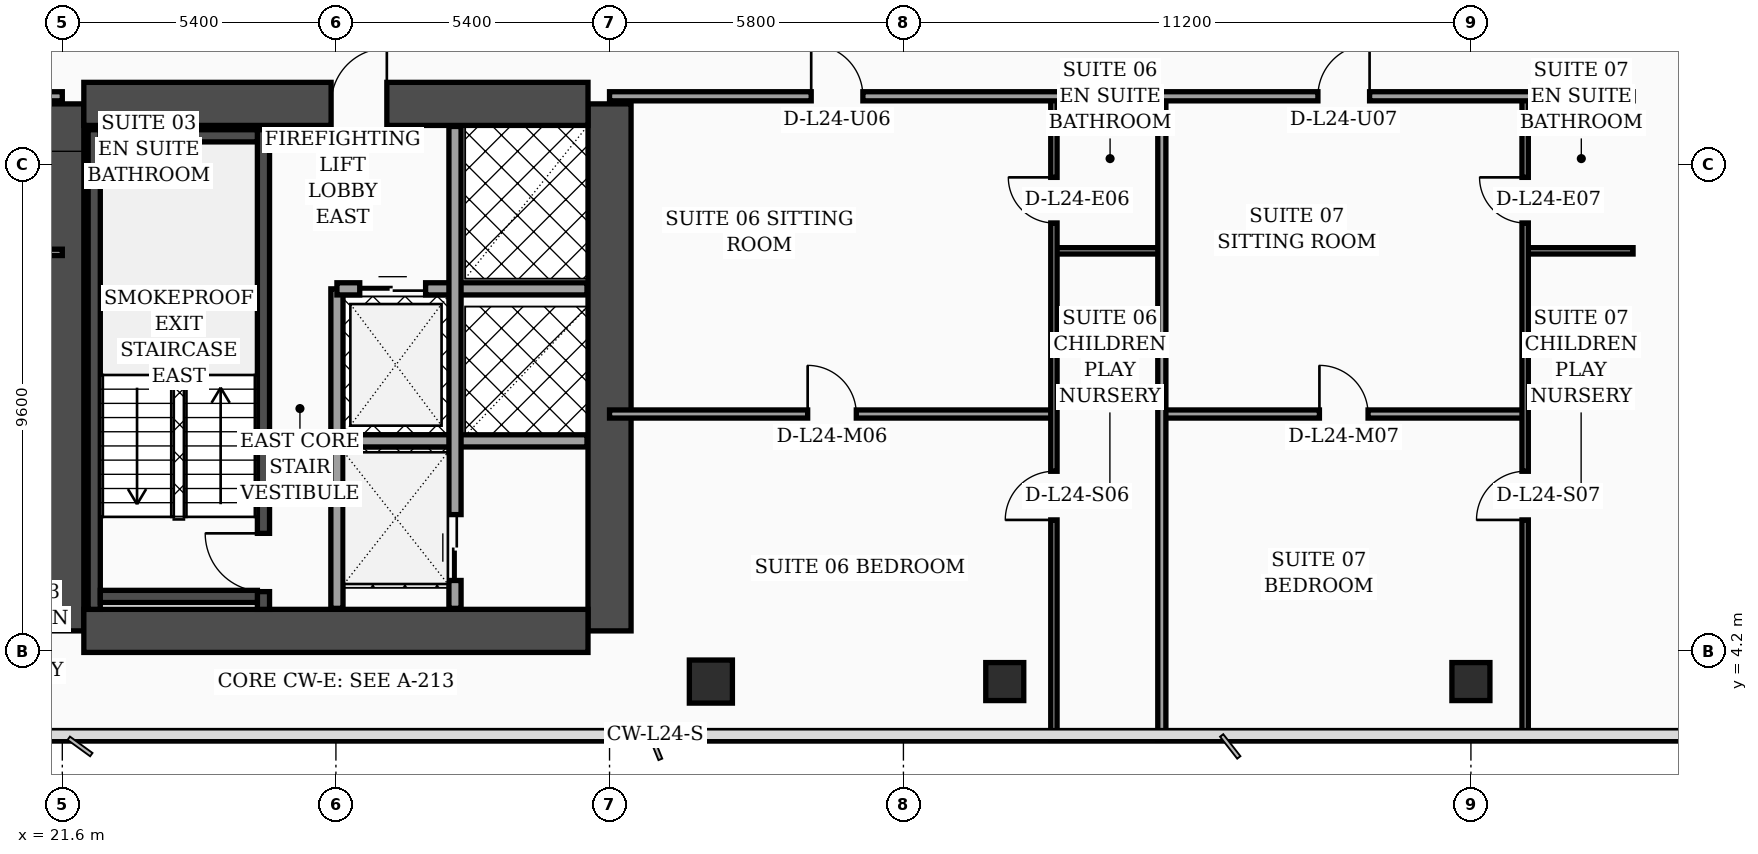
"""IFC4 building model, lengths in metres.
Left out: names, types, materials, properties, quantities, classifications, styles, units other than length and angle.
Written with IfcOpenShell. Run it as: python <this file> out.ifc"""

import sys

from ifc_helpers import new_model, si_unit, direction, frame, frame_2d, origin, origin_2d, place, context, subcontext, project, spatial, rectangle, hollow_rectangle, extrude, element, fill, save


model = new_model("IFC4")
c1 = context("Model", 3, precision=1e-05, world=origin(), true_north=direction((0.0, 1.0)))
c2 = subcontext(c1, "Body", "Model", "MODEL_VIEW")
j1 = project(units=[si_unit("LENGTHUNIT", "METRE"), si_unit("PLANEANGLEUNIT", "RADIAN")], contexts=[c1])
p1 = place(None, origin())
s1 = spatial("IfcSite", under=j1, at=p1, CompositionType="ELEMENT")
p2 = place(p1, origin())
s2 = spatial("IfcBuilding", under=s1, at=p2, CompositionType="ELEMENT")
p3 = place(p2, frame((0.0, 0.0, 101.2)))
s3 = spatial("IfcBuildingStorey", under=s2, at=p3, CompositionType="ELEMENT", Elevation=101.2)
for number, where, z_axis, x_axis in (
    (1, (21.6, 4.6, 0.0), (0.0, 0.0, 1.0), (0.0, 1.0, 0.0)),
    (2, (32.4, 4.6, 0.0), (0.0, 0.0, 1.0), (0.0, 1.0, 0.0)),
):
    element("IfcWall", number, at=place(p3, frame(where, z_axis=z_axis, x_axis=x_axis)), inside=s3, PredefinedType="SHEAR", context=c2, shape_type="SweptSolid", body=[
        extrude(rectangle(XDim=10.4, YDim=0.85, at=frame_2d((5.2, 0.0))), origin(), (0.0, 0.0, 1.0), 3.56),
    ])
p4 = place(p3, frame((22.025, 15.0, 0.0), z_axis=(0.0, 0.0, 1.0), x_axis=(1.0, 0.0, 0.0)))
e3 = element("IfcWall", 3, at=p4, inside=s3, PredefinedType="SHEAR", context=c2, shape_type="SweptSolid", body=[
    extrude(rectangle(XDim=9.95, YDim=0.85, at=frame_2d((4.975, 0.0))), origin(), (0.0, 0.0, 1.0), 3.56),
])
p5 = place(p4, frame((4.88, 0.0, 0.0)))
e4 = element("IfcOpeningElement", 4, at=p5, cuts=e3, PredefinedType="OPENING", context=c2, shape_type="SweptSolid", body=[
    extrude(rectangle(XDim=1.1, YDim=2.2, at=frame_2d((0.55, 1.1))), frame((0.0, 0.435, 0.0), z_axis=(0.0, -1.0, 0.0), x_axis=(1.0, 0.0, 0.0)), (0.0, 0.0, 1.0), 0.87),
])
p6 = place(p3, frame((22.025, 4.6, 0.0), z_axis=(0.0, 0.0, 1.0), x_axis=(1.0, 0.0, 0.0)))
e5 = element("IfcWall", 5, at=p6, inside=s3, PredefinedType="SHEAR", context=c2, shape_type="SweptSolid", body=[
    extrude(rectangle(XDim=9.95, YDim=0.85, at=frame_2d((4.975, 0.0))), origin(), (0.0, 0.0, 1.0), 3.56),
])
p7 = place(p3, frame((22.23, 5.025, 0.0), z_axis=(0.0, 0.0, 1.0), x_axis=(0.0, 1.0, 0.0)))
e6 = element("IfcWall", 6, at=p7, inside=s3, PredefinedType="SOLIDWALL", context=c2, shape_type="SweptSolid", body=[
    extrude(rectangle(XDim=9.465, YDim=0.24, at=frame_2d((4.732, 0.0))), origin(), (0.0, 0.0, 1.0), 3.56),
])
p8 = place(p3, frame((25.57, 5.025, 0.0), z_axis=(0.0, 0.0, 1.0), x_axis=(0.0, 1.0, 0.0)))
e7 = element("IfcWall", 7, at=p8, inside=s3, PredefinedType="SOLIDWALL", context=c2, shape_type="SweptSolid", body=[
    extrude(rectangle(XDim=9.465, YDim=0.24, at=frame_2d((4.732, 0.0))), origin(), (0.0, 0.0, 1.0), 3.56),
])
p9 = place(p8, frame((0.35, 0.0, 0.0)))
e8 = element("IfcOpeningElement", 8, at=p9, cuts=e7, PredefinedType="OPENING", context=c2, shape_type="SweptSolid", body=[
    extrude(rectangle(XDim=1.15, YDim=2.2, at=frame_2d((0.575, 1.1))), frame((0.0, 0.13, 0.0), z_axis=(0.0, -1.0, 0.0), x_axis=(1.0, 0.0, 0.0)), (0.0, 0.0, 1.0), 0.26),
])
for number, where, z_axis, x_axis in (
    (9, (22.35, 5.28, 0.0), (0.0, 0.0, 1.0), (1.0, 0.0, 0.0)),
    (10, (22.35, 14.37, 0.0), (0.0, 0.0, 1.0), (1.0, 0.0, 0.0)),
):
    element("IfcWall", number, at=place(p3, frame(where, z_axis=z_axis, x_axis=x_axis)), inside=s3, PredefinedType="SOLIDWALL", context=c2, shape_type="SweptSolid", body=[
        extrude(rectangle(XDim=3.1, YDim=0.24, at=frame_2d((1.55, 0.0))), origin(), (0.0, 0.0, 1.0), 3.56),
    ])
p10 = place(p3, frame((34.4, 3.6, 0.0), z_axis=(0.0, 0.0, 1.0), x_axis=(1.0, 0.0, 0.0)))
e11 = element("IfcColumn", 11, at=p10, inside=s3, PredefinedType="COLUMN", context=c2, shape_type="SweptSolid", body=[
    extrude(hollow_rectangle(XDim=0.85, YDim=0.85, WallThickness=0.036, at=origin_2d()), origin(), (0.0, 0.0, 1.0), 3.56),
])
for number, where, z_axis, x_axis in (
    (12, (40.2, 3.6, 0.0), (0.0, 0.0, 1.0), (1.0, 0.0, 0.0)),
    (13, (49.4, 3.6, 0.0), (0.0, 0.0, 1.0), (1.0, 0.0, 0.0)),
):
    element("IfcColumn", number, at=place(p3, frame(where, z_axis=z_axis, x_axis=x_axis)), inside=s3, PredefinedType="COLUMN", context=c2, shape_type="SweptSolid", body=[
        extrude(hollow_rectangle(XDim=0.75, YDim=0.75, WallThickness=0.032, at=origin_2d()), origin(), (0.0, 0.0, 1.0), 3.56),
    ])
p11 = place(p3, frame((59.23, 5.505, 0.0), z_axis=(0.0, 0.0, 1.0), x_axis=(-0.300509063924, 0.953778958931, 0.0)))
e14 = element("IfcWall", 14, at=p11, inside=s3, PredefinedType="SOLIDWALL", context=c2, shape_type="SweptSolid", body=[
    extrude(rectangle(XDim=30.814, YDim=0.32, at=frame_2d((15.407, 0.0))), origin(), (0.0, 0.0, 1.0), 3.56),
])
p12 = place(p11, frame((4.747, 0.0, 0.0)))
e15 = element("IfcOpeningElement", 15, at=p12, cuts=e14, PredefinedType="OPENING", context=c2, shape_type="SweptSolid", body=[
    extrude(rectangle(XDim=1.4, YDim=2.25, at=frame_2d((0.7, 1.125))), frame((0.0, 0.17, 0.0), z_axis=(0.0, -1.0, 0.0), x_axis=(1.0, 0.0, 0.0)), (0.0, 0.0, 1.0), 0.34),
])
p13 = place(p11, frame((1.6, 0.0, 0.75)))
e16 = element("IfcOpeningElement", 16, at=p13, cuts=e14, PredefinedType="OPENING", context=c2, shape_type="SweptSolid", body=[
    extrude(rectangle(XDim=1.5, YDim=1.6, at=frame_2d((0.75, 0.8))), frame((0.0, 0.17, 0.0), z_axis=(0.0, -1.0, 0.0), x_axis=(1.0, 0.0, 0.0)), (0.0, 0.0, 1.0), 0.34),
])
p14 = place(p11, frame((7.8, 0.0, 0.75)))
e17 = element("IfcOpeningElement", 17, at=p14, cuts=e14, PredefinedType="OPENING", context=c2, shape_type="SweptSolid", body=[
    extrude(rectangle(XDim=1.5, YDim=1.6, at=frame_2d((0.75, 0.8))), frame((0.0, 0.17, 0.0), z_axis=(0.0, -1.0, 0.0), x_axis=(1.0, 0.0, 0.0)), (0.0, 0.0, 1.0), 0.34),
])
p15 = place(p11, frame((10.9, 0.0, 0.75)))
e18 = element("IfcOpeningElement", 18, at=p15, cuts=e14, PredefinedType="OPENING", context=c2, shape_type="SweptSolid", body=[
    extrude(rectangle(XDim=1.5, YDim=1.6, at=frame_2d((0.75, 0.8))), frame((0.0, 0.17, 0.0), z_axis=(0.0, -1.0, 0.0), x_axis=(1.0, 0.0, 0.0)), (0.0, 0.0, 1.0), 0.34),
])
p16 = place(p11, frame((14.0, 0.0, 0.75)))
e19 = element("IfcOpeningElement", 19, at=p16, cuts=e14, PredefinedType="OPENING", context=c2, shape_type="SweptSolid", body=[
    extrude(rectangle(XDim=1.5, YDim=1.6, at=frame_2d((0.75, 0.8))), frame((0.0, 0.17, 0.0), z_axis=(0.0, -1.0, 0.0), x_axis=(1.0, 0.0, 0.0)), (0.0, 0.0, 1.0), 0.34),
])
p17 = place(p11, frame((17.1, 0.0, 0.75)))
e20 = element("IfcOpeningElement", 20, at=p17, cuts=e14, PredefinedType="OPENING", context=c2, shape_type="SweptSolid", body=[
    extrude(rectangle(XDim=1.5, YDim=1.6, at=frame_2d((0.75, 0.8))), frame((0.0, 0.17, 0.0), z_axis=(0.0, -1.0, 0.0), x_axis=(1.0, 0.0, 0.0)), (0.0, 0.0, 1.0), 0.34),
])
p18 = place(p11, frame((20.2, 0.0, 0.75)))
e21 = element("IfcOpeningElement", 21, at=p18, cuts=e14, PredefinedType="OPENING", context=c2, shape_type="SweptSolid", body=[
    extrude(rectangle(XDim=1.5, YDim=1.6, at=frame_2d((0.75, 0.8))), frame((0.0, 0.17, 0.0), z_axis=(0.0, -1.0, 0.0), x_axis=(1.0, 0.0, 0.0)), (0.0, 0.0, 1.0), 0.34),
])
p19 = place(p11, frame((23.3, 0.0, 0.75)))
e22 = element("IfcOpeningElement", 22, at=p19, cuts=e14, PredefinedType="OPENING", context=c2, shape_type="SweptSolid", body=[
    extrude(rectangle(XDim=1.5, YDim=1.6, at=frame_2d((0.75, 0.8))), frame((0.0, 0.17, 0.0), z_axis=(0.0, -1.0, 0.0), x_axis=(1.0, 0.0, 0.0)), (0.0, 0.0, 1.0), 0.34),
])
p20 = place(p11, frame((26.4, 0.0, 0.75)))
e23 = element("IfcOpeningElement", 23, at=p20, cuts=e14, PredefinedType="OPENING", context=c2, shape_type="SweptSolid", body=[
    extrude(rectangle(XDim=1.5, YDim=1.6, at=frame_2d((0.75, 0.8))), frame((0.0, 0.17, 0.0), z_axis=(0.0, -1.0, 0.0), x_axis=(1.0, 0.0, 0.0)), (0.0, 0.0, 1.0), 0.34),
])
p21 = place(p3, frame((27.02, 5.045, 0.0), z_axis=(0.0, 0.0, 1.0), x_axis=(0.0, 1.0, 0.0)))
e24 = element("IfcWall", 24, at=p21, inside=s3, PredefinedType="SOLIDWALL", context=c2, shape_type="SweptSolid", body=[
    extrude(rectangle(XDim=6.305, YDim=0.24, at=frame_2d((3.153, 0.0))), origin(), (0.0, 0.0, 1.0), 3.56),
])
p22 = place(p3, frame((27.02, 11.35, 0.0), z_axis=(0.0, 0.0, 1.0), x_axis=(1.0, 0.0, 0.0)))
e25 = element("IfcWall", 25, at=p22, inside=s3, PredefinedType="SOLIDWALL", context=c2, shape_type="SweptSolid", body=[
    extrude(rectangle(XDim=4.935, YDim=0.24, at=frame_2d((2.468, 0.0))), origin(), (0.0, 0.0, 1.0), 3.56),
])
p23 = place(p22, frame((0.45, 0.0, 0.0)))
e26 = element("IfcOpeningElement", 26, at=p23, cuts=e25, PredefinedType="OPENING", context=c2, shape_type="SweptSolid", body=[
    extrude(rectangle(XDim=1.3, YDim=2.35, at=frame_2d((0.65, 1.175))), frame((0.0, 0.13, 0.0), z_axis=(0.0, -1.0, 0.0), x_axis=(1.0, 0.0, 0.0)), (0.0, 0.0, 1.0), 0.26),
])
p24 = place(p3, frame((27.02, 8.35, 0.0), z_axis=(0.0, 0.0, 1.0), x_axis=(1.0, 0.0, 0.0)))
e27 = element("IfcWall", 27, at=p24, inside=s3, PredefinedType="SOLIDWALL", context=c2, shape_type="SweptSolid", body=[
    extrude(rectangle(XDim=4.935, YDim=0.24, at=frame_2d((2.468, 0.0))), origin(), (0.0, 0.0, 1.0), 3.56),
])
p25 = place(p3, frame((29.35, 5.045, 0.0), z_axis=(0.0, 0.0, 1.0), x_axis=(0.0, 1.0, 0.0)))
e28 = element("IfcWall", 28, at=p25, inside=s3, PredefinedType="SOLIDWALL", context=c2, shape_type="SweptSolid", body=[
    extrude(rectangle(XDim=9.51, YDim=0.24, at=frame_2d((4.755, 0.0))), origin(), (0.0, 0.0, 1.0), 3.56),
])
p26 = place(p25, frame((0.55, 0.0, 0.0)))
e29 = element("IfcOpeningElement", 29, at=p26, cuts=e28, PredefinedType="OPENING", context=c2, shape_type="SweptSolid", body=[
    extrude(rectangle(XDim=1.3, YDim=2.35, at=frame_2d((0.65, 1.175))), frame((0.0, 0.13, 0.0), z_axis=(0.0, -1.0, 0.0), x_axis=(1.0, 0.0, 0.0)), (0.0, 0.0, 1.0), 0.26),
])
p27 = place(p3, frame((19.6, 12.07, 0.0), z_axis=(0.0, 0.0, 1.0), x_axis=(1.0, 0.0, 0.0)))
e30 = element("IfcWall", 30, at=p27, inside=s3, PredefinedType="PARTITIONING", context=c2, shape_type="SweptSolid", body=[
    extrude(rectangle(XDim=2.0, YDim=0.125, at=frame_2d((1.0, 0.0))), origin(), (0.0, 0.0, 1.0), 3.56),
])
p28 = place(p3, frame((15.15, 15.15, 0.0), z_axis=(0.0, 0.0, 1.0), x_axis=(1.0, 0.0, 0.0)))
e31 = element("IfcWall", 31, at=p28, inside=s3, PredefinedType="PARTITIONING", context=c2, shape_type="SweptSolid", body=[
    extrude(rectangle(XDim=6.45, YDim=0.18, at=frame_2d((3.225, 0.0))), origin(), (0.0, 0.0, 1.0), 2.49),
])
p29 = place(p28, frame((1.74, 0.0, 0.0)))
e32 = element("IfcOpeningElement", 32, at=p29, cuts=e31, PredefinedType="OPENING", context=c2, shape_type="SweptSolid", body=[
    extrude(rectangle(XDim=1.02, YDim=2.2, at=frame_2d((0.51, 1.1))), frame((0.0, 0.1, 0.0), z_axis=(0.0, -1.0, 0.0), x_axis=(1.0, 0.0, 0.0)), (0.0, 0.0, 1.0), 0.2),
])
p30 = place(p3, frame((41.17, 12.1, 0.0), z_axis=(0.0, 0.0, 1.0), x_axis=(1.0, 0.0, 0.0)))
e33 = element("IfcWall", 33, at=p30, inside=s3, PredefinedType="PARTITIONING", context=c2, shape_type="SweptSolid", body=[
    extrude(rectangle(XDim=2.13, YDim=0.125, at=frame_2d((1.065, 0.0))), origin(), (0.0, 0.0, 1.0), 3.56),
])
p31 = place(p3, frame((32.4, 8.88, 0.0), z_axis=(0.0, 0.0, 1.0), x_axis=(1.0, 0.0, 0.0)))
e34 = element("IfcWall", 34, at=p31, inside=s3, PredefinedType="PARTITIONING", context=c2, shape_type="SweptSolid", body=[
    extrude(rectangle(XDim=8.77, YDim=0.16, at=frame_2d((4.385, 0.0))), origin(), (0.0, 0.0, 1.0), 2.84),
])
p32 = place(p31, frame((3.91, 0.0, 0.0)))
e35 = element("IfcOpeningElement", 35, at=p32, cuts=e34, PredefinedType="OPENING", context=c2, shape_type="SweptSolid", body=[
    extrude(rectangle(XDim=0.96, YDim=2.2, at=frame_2d((0.48, 1.1))), frame((0.0, 0.09, 0.0), z_axis=(0.0, -1.0, 0.0), x_axis=(1.0, 0.0, 0.0)), (0.0, 0.0, 1.0), 0.18),
])
p33 = place(p3, frame((41.17, 2.44, 0.0), z_axis=(0.0, 0.0, 1.0), x_axis=(0.0, 1.0, 0.0)))
e36 = element("IfcWall", 36, at=p33, inside=s3, PredefinedType="PARTITIONING", context=c2, shape_type="SweptSolid", body=[
    extrude(rectangle(XDim=12.71, YDim=0.125, at=frame_2d((6.355, 0.0))), origin(), (0.0, 0.0, 1.0), 3.04),
])
p34 = place(p33, frame((4.35, 0.0, 0.0)))
e37 = element("IfcOpeningElement", 37, at=p34, cuts=e36, PredefinedType="OPENING", context=c2, shape_type="SweptSolid", body=[
    extrude(rectangle(XDim=0.96, YDim=2.2, at=frame_2d((0.48, 1.1))), frame((0.0, 0.073, 0.0), z_axis=(0.0, -1.0, 0.0), x_axis=(1.0, 0.0, 0.0)), (0.0, 0.0, 1.0), 0.145),
])
p35 = place(p33, frame((10.21, 0.0, 0.0)))
e38 = element("IfcOpeningElement", 38, at=p35, cuts=e36, PredefinedType="OPENING", context=c2, shape_type="SweptSolid", body=[
    extrude(rectangle(XDim=0.9, YDim=2.15, at=frame_2d((0.45, 1.075))), frame((0.0, 0.073, 0.0), z_axis=(0.0, -1.0, 0.0), x_axis=(1.0, 0.0, 0.0)), (0.0, 0.0, 1.0), 0.145),
])
p36 = place(p3, frame((50.47, 12.1, 0.0), z_axis=(0.0, 0.0, 1.0), x_axis=(1.0, 0.0, 0.0)))
e39 = element("IfcWall", 39, at=p36, inside=s3, PredefinedType="PARTITIONING", context=c2, shape_type="SweptSolid", body=[
    extrude(rectangle(XDim=2.13, YDim=0.125, at=frame_2d((1.065, 0.0))), origin(), (0.0, 0.0, 1.0), 3.56),
])
p37 = place(p3, frame((43.3, 8.88, 0.0), z_axis=(0.0, 0.0, 1.0), x_axis=(1.0, 0.0, 0.0)))
e40 = element("IfcWall", 40, at=p37, inside=s3, PredefinedType="PARTITIONING", context=c2, shape_type="SweptSolid", body=[
    extrude(rectangle(XDim=7.17, YDim=0.16, at=frame_2d((3.585, 0.0))), origin(), (0.0, 0.0, 1.0), 2.84),
])
p38 = place(p37, frame((3.11, 0.0, 0.0)))
e41 = element("IfcOpeningElement", 41, at=p38, cuts=e40, PredefinedType="OPENING", context=c2, shape_type="SweptSolid", body=[
    extrude(rectangle(XDim=0.96, YDim=2.2, at=frame_2d((0.48, 1.1))), frame((0.0, 0.09, 0.0), z_axis=(0.0, -1.0, 0.0), x_axis=(1.0, 0.0, 0.0)), (0.0, 0.0, 1.0), 0.18),
])
p39 = place(p3, frame((50.47, 2.44, 0.0), z_axis=(0.0, 0.0, 1.0), x_axis=(0.0, 1.0, 0.0)))
e42 = element("IfcWall", 42, at=p39, inside=s3, PredefinedType="PARTITIONING", context=c2, shape_type="SweptSolid", body=[
    extrude(rectangle(XDim=12.71, YDim=0.125, at=frame_2d((6.355, 0.0))), origin(), (0.0, 0.0, 1.0), 3.04),
])
p40 = place(p39, frame((4.35, 0.0, 0.0)))
e43 = element("IfcOpeningElement", 43, at=p40, cuts=e42, PredefinedType="OPENING", context=c2, shape_type="SweptSolid", body=[
    extrude(rectangle(XDim=0.96, YDim=2.2, at=frame_2d((0.48, 1.1))), frame((0.0, 0.073, 0.0), z_axis=(0.0, -1.0, 0.0), x_axis=(1.0, 0.0, 0.0)), (0.0, 0.0, 1.0), 0.145),
])
p41 = place(p39, frame((10.21, 0.0, 0.0)))
e44 = element("IfcOpeningElement", 44, at=p41, cuts=e42, PredefinedType="OPENING", context=c2, shape_type="SweptSolid", body=[
    extrude(rectangle(XDim=0.9, YDim=2.15, at=frame_2d((0.45, 1.075))), frame((0.0, 0.073, 0.0), z_axis=(0.0, -1.0, 0.0), x_axis=(1.0, 0.0, 0.0)), (0.0, 0.0, 1.0), 0.145),
])
p42 = place(p3, frame((43.3, 2.44, 0.0), z_axis=(0.0, 0.0, 1.0), x_axis=(0.0, 1.0, 0.0)))
e45 = element("IfcWall", 45, at=p42, inside=s3, PredefinedType="PARTITIONING", context=c2, shape_type="SweptSolid", body=[
    extrude(rectangle(XDim=12.71, YDim=0.16, at=frame_2d((6.355, 0.0))), origin(), (0.0, 0.0, 1.0), 3.04),
])
p43 = place(p3, frame((32.4, 15.15, 0.0), z_axis=(0.0, 0.0, 1.0), x_axis=(1.0, 0.0, 0.0)))
e46 = element("IfcWall", 46, at=p43, inside=s3, PredefinedType="PARTITIONING", context=c2, shape_type="SweptSolid", body=[
    extrude(rectangle(XDim=20.2, YDim=0.18, at=frame_2d((10.1, 0.0))), origin(), (0.0, 0.0, 1.0), 2.84),
])
p44 = place(p43, frame((3.98, 0.0, 0.0)))
e47 = element("IfcOpeningElement", 47, at=p44, cuts=e46, PredefinedType="OPENING", context=c2, shape_type="SweptSolid", body=[
    extrude(rectangle(XDim=1.02, YDim=2.2, at=frame_2d((0.51, 1.1))), frame((0.0, 0.1, 0.0), z_axis=(0.0, -1.0, 0.0), x_axis=(1.0, 0.0, 0.0)), (0.0, 0.0, 1.0), 0.2),
])
p45 = place(p43, frame((13.98, 0.0, 0.0)))
e48 = element("IfcOpeningElement", 48, at=p45, cuts=e46, PredefinedType="OPENING", context=c2, shape_type="SweptSolid", body=[
    extrude(rectangle(XDim=1.02, YDim=2.2, at=frame_2d((0.51, 1.1))), frame((0.0, 0.1, 0.0), z_axis=(0.0, -1.0, 0.0), x_axis=(1.0, 0.0, 0.0)), (0.0, 0.0, 1.0), 0.2),
])
p46 = place(p23, origin())
e49 = element("IfcDoor", 49, at=p46, inside=s3, OperationType="DOUBLE_DOOR_SLIDING", PredefinedType="DOOR", context=c2, shape_type="SweptSolid", body=[
    extrude(rectangle(XDim=1.3, YDim=2.35, at=frame_2d((0.65, 1.175))), frame((0.0, 0.025, 0.0), z_axis=(0.0, -1.0, 0.0), x_axis=(1.0, 0.0, 0.0)), (0.0, 0.0, 1.0), 0.05),
])
fill(e26, e49)
p47 = place(p26, origin())
e50 = element("IfcDoor", 50, at=p47, inside=s3, OperationType="DOUBLE_DOOR_SLIDING", PredefinedType="DOOR", context=c2, shape_type="SweptSolid", body=[
    extrude(rectangle(XDim=1.3, YDim=2.35, at=frame_2d((0.65, 1.175))), frame((0.0, 0.025, 0.0), z_axis=(0.0, -1.0, 0.0), x_axis=(1.0, 0.0, 0.0)), (0.0, 0.0, 1.0), 0.05),
])
fill(e29, e50)
p48 = place(p32, origin())
e51 = element("IfcDoor", 51, at=p48, inside=s3, OperationType="SINGLE_SWING_LEFT", PredefinedType="DOOR", context=c2, shape_type="SweptSolid", body=[
    extrude(rectangle(XDim=0.96, YDim=2.2, at=frame_2d((0.48, 1.1))), frame((0.0, 0.025, 0.0), z_axis=(0.0, -1.0, 0.0), x_axis=(1.0, 0.0, 0.0)), (0.0, 0.0, 1.0), 0.05),
])
fill(e35, e51)
p49 = place(p34, origin())
e52 = element("IfcDoor", 52, at=p49, inside=s3, OperationType="SINGLE_SWING_LEFT", PredefinedType="DOOR", context=c2, shape_type="SweptSolid", body=[
    extrude(rectangle(XDim=0.96, YDim=2.2, at=frame_2d((0.48, 1.1))), frame((0.0, 0.025, 0.0), z_axis=(0.0, -1.0, 0.0), x_axis=(1.0, 0.0, 0.0)), (0.0, 0.0, 1.0), 0.05),
])
fill(e37, e52)
p50 = place(p35, origin())
e53 = element("IfcDoor", 53, at=p50, inside=s3, OperationType="SINGLE_SWING_RIGHT", PredefinedType="DOOR", context=c2, shape_type="SweptSolid", body=[
    extrude(rectangle(XDim=0.9, YDim=2.15, at=frame_2d((0.45, 1.075))), frame((0.0, 0.025, 0.0), z_axis=(0.0, -1.0, 0.0), x_axis=(1.0, 0.0, 0.0)), (0.0, 0.0, 1.0), 0.05),
])
fill(e38, e53)
p51 = place(p38, origin())
e54 = element("IfcDoor", 54, at=p51, inside=s3, OperationType="SINGLE_SWING_LEFT", PredefinedType="DOOR", context=c2, shape_type="SweptSolid", body=[
    extrude(rectangle(XDim=0.96, YDim=2.2, at=frame_2d((0.48, 1.1))), frame((0.0, 0.025, 0.0), z_axis=(0.0, -1.0, 0.0), x_axis=(1.0, 0.0, 0.0)), (0.0, 0.0, 1.0), 0.05),
])
fill(e41, e54)
p52 = place(p40, origin())
e55 = element("IfcDoor", 55, at=p52, inside=s3, OperationType="SINGLE_SWING_LEFT", PredefinedType="DOOR", context=c2, shape_type="SweptSolid", body=[
    extrude(rectangle(XDim=0.96, YDim=2.2, at=frame_2d((0.48, 1.1))), frame((0.0, 0.025, 0.0), z_axis=(0.0, -1.0, 0.0), x_axis=(1.0, 0.0, 0.0)), (0.0, 0.0, 1.0), 0.05),
])
fill(e43, e55)
p53 = place(p41, origin())
e56 = element("IfcDoor", 56, at=p53, inside=s3, OperationType="SINGLE_SWING_RIGHT", PredefinedType="DOOR", context=c2, shape_type="SweptSolid", body=[
    extrude(rectangle(XDim=0.9, YDim=2.15, at=frame_2d((0.45, 1.075))), frame((0.0, 0.025, 0.0), z_axis=(0.0, -1.0, 0.0), x_axis=(1.0, 0.0, 0.0)), (0.0, 0.0, 1.0), 0.05),
])
fill(e44, e56)
p54 = place(p44, origin())
e57 = element("IfcDoor", 57, at=p54, inside=s3, OperationType="SINGLE_SWING_LEFT", PredefinedType="DOOR", context=c2, shape_type="SweptSolid", body=[
    extrude(rectangle(XDim=1.02, YDim=2.2, at=frame_2d((0.51, 1.1))), frame((0.0, 0.025, 0.0), z_axis=(0.0, -1.0, 0.0), x_axis=(1.0, 0.0, 0.0)), (0.0, 0.0, 1.0), 0.05),
])
fill(e47, e57)
p55 = place(p45, origin())
e58 = element("IfcDoor", 58, at=p55, inside=s3, OperationType="SINGLE_SWING_RIGHT", PredefinedType="DOOR", context=c2, shape_type="SweptSolid", body=[
    extrude(rectangle(XDim=1.02, YDim=2.2, at=frame_2d((0.51, 1.1))), frame((0.0, 0.025, 0.0), z_axis=(0.0, -1.0, 0.0), x_axis=(1.0, 0.0, 0.0)), (0.0, 0.0, 1.0), 0.05),
])
fill(e48, e58)
p56 = place(p9, origin())
e59 = element("IfcDoor", 59, at=p56, inside=s3, OperationType="SINGLE_SWING_RIGHT", PredefinedType="DOOR", context=c2, shape_type="SweptSolid", body=[
    extrude(rectangle(XDim=1.15, YDim=2.2, at=frame_2d((0.575, 1.1))), frame((0.0, 0.025, 0.0), z_axis=(0.0, -1.0, 0.0), x_axis=(1.0, 0.0, 0.0)), (0.0, 0.0, 1.0), 0.05),
])
fill(e8, e59)
p57 = place(p5, origin())
e60 = element("IfcDoor", 60, at=p57, inside=s3, OperationType="SINGLE_SWING_RIGHT", PredefinedType="DOOR", context=c2, shape_type="SweptSolid", body=[
    extrude(rectangle(XDim=1.1, YDim=2.2, at=frame_2d((0.55, 1.1))), frame((0.0, 0.025, 0.0), z_axis=(0.0, -1.0, 0.0), x_axis=(1.0, 0.0, 0.0)), (0.0, 0.0, 1.0), 0.05),
])
fill(e4, e60)
save(model, sys.argv[1])
